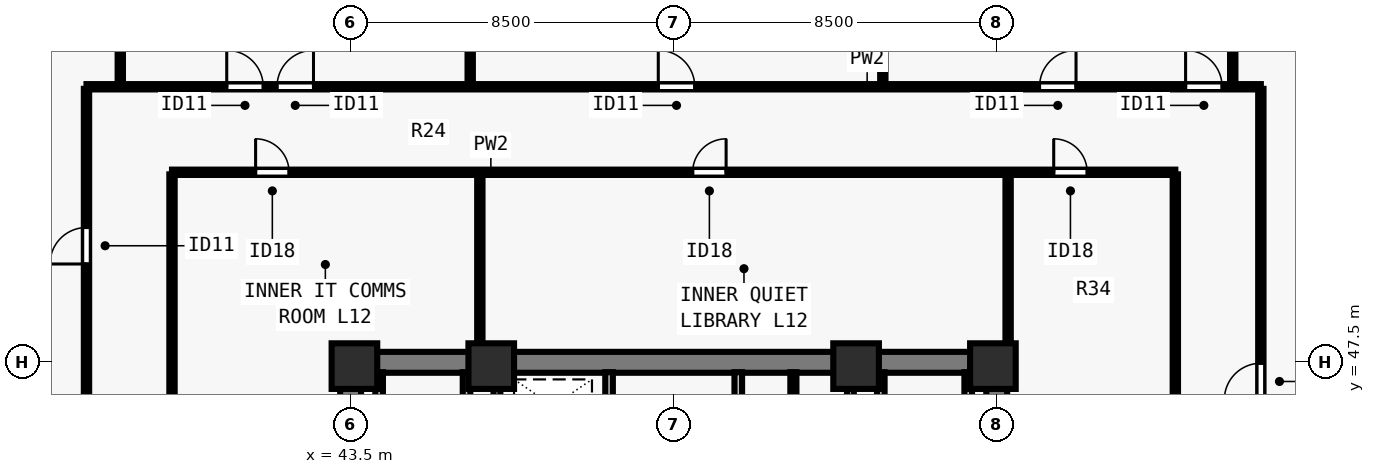
"""IFC4 building model, lengths in metres.
Left out: names, types, materials, properties, quantities, classifications, styles, units other than length and angle.
Written with IfcOpenShell. Run it as: python <this file> out.ifc"""

import sys

from ifc_helpers import new_model, si_unit, direction, frame, frame_2d, origin, origin_2d, place, context, subcontext, project, spatial, rectangle, extrude, element, fill, save


model = new_model("IFC4")
c1 = context("Model", 3, precision=1e-05, world=origin(), true_north=direction((0.0, 1.0)))
c2 = subcontext(c1, "Body", "Model", "MODEL_VIEW")
j1 = project(units=[si_unit("LENGTHUNIT", "METRE"), si_unit("PLANEANGLEUNIT", "RADIAN")], contexts=[c1])
p1 = place(None, origin())
s1 = spatial("IfcSite", under=j1, at=p1, CompositionType="ELEMENT")
p2 = place(p1, origin())
s2 = spatial("IfcBuilding", under=s1, at=p2, CompositionType="ELEMENT")
p3 = place(p2, frame((0.0, 0.0, 48.0)))
s3 = spatial("IfcBuildingStorey", under=s2, at=p3, CompositionType="ELEMENT", Elevation=48.0)
for number, where, z_axis, x_axis in (
    (1, (43.6, 47.4, 0.0), (0.0, 0.0, 1.0), (1.0, 0.0, 0.0)),
    (2, (47.2, 47.4, 0.0), (0.0, 0.0, 1.0), (1.0, 0.0, 0.0)),
    (3, (56.8, 47.4, 0.0), (0.0, 0.0, 1.0), (1.0, 0.0, 0.0)),
    (4, (60.4, 47.4, 0.0), (0.0, 0.0, 1.0), (1.0, 0.0, 0.0)),
):
    element("IfcColumn", number, at=place(p3, frame(where, z_axis=z_axis, x_axis=x_axis)), inside=s3, PredefinedType="COLUMN", context=c2, shape_type="SweptSolid", body=[
        extrude(rectangle(XDim=1.2, YDim=1.2, at=origin_2d()), origin(), (0.0, 0.0, 1.0), 3.5),
    ])
p4 = place(p3, frame((43.225, 47.5, 0.0), z_axis=(0.0, 0.0, 1.0), x_axis=(1.0, 0.0, 0.0)))
e5 = element("IfcWall", 5, at=p4, inside=s3, PredefinedType="SHEAR", context=c2, shape_type="SweptSolid", body=[
    extrude(rectangle(XDim=17.55, YDim=0.55, at=frame_2d((8.775, 0.0))), origin(), (0.0, 0.0, 1.0), 3.28),
])
for number, where, z_axis, x_axis in (
    (6, (43.5, 40.8, 0.0), (0.0, 0.0, 1.0), (0.0, 1.0, 0.0)),
    (7, (60.5, 40.8, 0.0), (0.0, 0.0, 1.0), (0.0, 1.0, 0.0)),
):
    element("IfcWall", number, at=place(p3, frame(where, z_axis=z_axis, x_axis=x_axis)), inside=s3, PredefinedType="SHEAR", context=c2, shape_type="SweptSolid", body=[
        extrude(rectangle(XDim=6.435, YDim=0.55, at=frame_2d((3.218, 0.0))), origin(), (0.0, 0.0, 1.0), 3.28),
    ])
p5 = place(p3, frame((50.3, 40.585, 0.0), z_axis=(0.0, 0.0, 1.0), x_axis=(0.0, 1.0, 0.0)))
e8 = element("IfcWall", 8, at=p5, inside=s3, PredefinedType="SOLIDWALL", context=c2, shape_type="SweptSolid", body=[
    extrude(rectangle(XDim=6.655, YDim=0.2, at=frame_2d((3.328, 0.0))), origin(), (0.0, 0.0, 1.0), 3.28),
])
p6 = place(p5, frame((5.065, 0.0, 0.0)))
e9 = element("IfcOpeningElement", 9, at=p6, cuts=e8, PredefinedType="OPENING", context=c2, shape_type="SweptSolid", body=[
    extrude(rectangle(XDim=0.8, YDim=2.08, at=frame_2d((0.4, 1.04))), frame((0.0, 0.11, 0.0), z_axis=(0.0, -1.0, 0.0), x_axis=(1.0, 0.0, 0.0)), (0.0, 0.0, 1.0), 0.22),
])
p7 = place(p3, frame((53.7, 40.585, 0.0), z_axis=(0.0, 0.0, 1.0), x_axis=(0.0, 1.0, 0.0)))
e10 = element("IfcWall", 10, at=p7, inside=s3, PredefinedType="SOLIDWALL", context=c2, shape_type="SweptSolid", body=[
    extrude(rectangle(XDim=6.655, YDim=0.2, at=frame_2d((3.328, 0.0))), origin(), (0.0, 0.0, 1.0), 3.28),
])
p8 = place(p7, frame((0.195, 0.0, 0.0)))
e11 = element("IfcOpeningElement", 11, at=p8, cuts=e10, PredefinedType="OPENING", context=c2, shape_type="SweptSolid", body=[
    extrude(rectangle(XDim=0.8, YDim=2.08, at=frame_2d((0.4, 1.04))), frame((0.0, 0.11, 0.0), z_axis=(0.0, -1.0, 0.0), x_axis=(1.0, 0.0, 0.0)), (0.0, 0.0, 1.0), 0.22),
])
p9 = place(p7, frame((4.265, 0.0, 0.0)))
e12 = element("IfcOpeningElement", 12, at=p9, cuts=e10, PredefinedType="OPENING", context=c2, shape_type="SweptSolid", body=[
    extrude(rectangle(XDim=0.95, YDim=2.12, at=frame_2d((0.475, 1.06))), frame((0.0, 0.11, 0.0), z_axis=(0.0, -1.0, 0.0), x_axis=(1.0, 0.0, 0.0)), (0.0, 0.0, 1.0), 0.22),
])
for number, where, z_axis, x_axis in (
    (13, (46.55, 43.735, 0.0), (0.0, 0.0, 1.0), (0.0, 1.0, 0.0)),
    (14, (44.25, 43.735, 0.0), (0.0, 0.0, 1.0), (0.0, 1.0, 0.0)),
    (15, (57.45, 43.735, 0.0), (0.0, 0.0, 1.0), (0.0, 1.0, 0.0)),
    (16, (59.75, 43.735, 0.0), (0.0, 0.0, 1.0), (0.0, 1.0, 0.0)),
):
    element("IfcWall", number, at=place(p3, frame(where, z_axis=z_axis, x_axis=x_axis)), inside=s3, PredefinedType="SOLIDWALL", context=c2, shape_type="SweptSolid", body=[
        extrude(rectangle(XDim=3.505, YDim=0.2, at=frame_2d((1.752, 0.0))), origin(), (0.0, 0.0, 1.0), 3.28),
    ])
for number, where, z_axis, x_axis in (
    (17, (47.35, 43.735, 0.0), (0.0, 0.0, 1.0), (0.0, 1.0, 0.0)),
    (18, (56.65, 43.735, 0.0), (0.0, 0.0, 1.0), (0.0, 1.0, 0.0)),
):
    element("IfcWall", number, at=place(p3, frame(where, z_axis=z_axis, x_axis=x_axis)), inside=s3, PredefinedType="SOLIDWALL", context=c2, shape_type="SweptSolid", body=[
        extrude(rectangle(XDim=3.505, YDim=0.18, at=frame_2d((1.752, 0.0))), origin(), (0.0, 0.0, 1.0), 3.28),
    ])
p10 = place(p3, frame((55.15, 44.195, 0.0), z_axis=(0.0, 0.0, 1.0), x_axis=(0.0, 1.0, 0.0)))
e19 = element("IfcWall", 19, at=p10, inside=s3, PredefinedType="PARTITIONING", context=c2, shape_type="SweptSolid", body=[
    extrude(rectangle(XDim=3.045, YDim=0.16, at=frame_2d((1.522, 0.0))), origin(), (0.0, 0.0, 1.0), 3.28),
])
p11 = place(p10, frame((1.025, 0.0, 0.0)))
e20 = element("IfcOpeningElement", 20, at=p11, cuts=e19, PredefinedType="OPENING", context=c2, shape_type="SweptSolid", body=[
    extrude(rectangle(XDim=0.8, YDim=2.1, at=frame_2d((0.4, 1.05))), frame((0.0, 0.09, 0.0), z_axis=(0.0, -1.0, 0.0), x_axis=(1.0, 0.0, 0.0)), (0.0, 0.0, 1.0), 0.18),
])
p12 = place(p3, frame((36.55, 54.75, 0.0), z_axis=(0.0, 0.0, 1.0), x_axis=(1.0, 0.0, 0.0)))
e21 = element("IfcWall", 21, at=p12, inside=s3, PredefinedType="PARTITIONING", context=c2, shape_type="SweptSolid", body=[
    extrude(rectangle(XDim=30.9, YDim=0.14, at=frame_2d((15.45, 0.0))), origin(), (0.0, 0.0, 1.0), 3.28),
])
p13 = place(p12, frame((3.69, 0.0, 0.0)))
e22 = element("IfcOpeningElement", 22, at=p13, cuts=e21, PredefinedType="OPENING", context=c2, shape_type="SweptSolid", body=[
    extrude(rectangle(XDim=0.96, YDim=2.12, at=frame_2d((0.48, 1.06))), frame((0.0, 0.08, 0.0), z_axis=(0.0, -1.0, 0.0), x_axis=(1.0, 0.0, 0.0)), (0.0, 0.0, 1.0), 0.16),
])
p14 = place(p12, frame((5.013, 0.0, 0.0)))
e23 = element("IfcOpeningElement", 23, at=p14, cuts=e21, PredefinedType="OPENING", context=c2, shape_type="SweptSolid", body=[
    extrude(rectangle(XDim=0.96, YDim=2.12, at=frame_2d((0.48, 1.06))), frame((0.0, 0.08, 0.0), z_axis=(0.0, -1.0, 0.0), x_axis=(1.0, 0.0, 0.0)), (0.0, 0.0, 1.0), 0.16),
])
p15 = place(p12, frame((15.045, 0.0, 0.0)))
e24 = element("IfcOpeningElement", 24, at=p15, cuts=e21, PredefinedType="OPENING", context=c2, shape_type="SweptSolid", body=[
    extrude(rectangle(XDim=0.96, YDim=2.12, at=frame_2d((0.48, 1.06))), frame((0.0, 0.08, 0.0), z_axis=(0.0, -1.0, 0.0), x_axis=(1.0, 0.0, 0.0)), (0.0, 0.0, 1.0), 0.16),
])
p16 = place(p12, frame((25.077, 0.0, 0.0)))
e25 = element("IfcOpeningElement", 25, at=p16, cuts=e21, PredefinedType="OPENING", context=c2, shape_type="SweptSolid", body=[
    extrude(rectangle(XDim=0.96, YDim=2.12, at=frame_2d((0.48, 1.06))), frame((0.0, 0.08, 0.0), z_axis=(0.0, -1.0, 0.0), x_axis=(1.0, 0.0, 0.0)), (0.0, 0.0, 1.0), 0.16),
])
p17 = place(p12, frame((28.92, 0.0, 0.0)))
e26 = element("IfcOpeningElement", 26, at=p17, cuts=e21, PredefinedType="OPENING", context=c2, shape_type="SweptSolid", body=[
    extrude(rectangle(XDim=0.96, YDim=2.12, at=frame_2d((0.48, 1.06))), frame((0.0, 0.08, 0.0), z_axis=(0.0, -1.0, 0.0), x_axis=(1.0, 0.0, 0.0)), (0.0, 0.0, 1.0), 0.16),
])
p18 = place(p3, frame((36.55, 23.305, 0.0), z_axis=(0.0, 0.0, 1.0), x_axis=(0.0, 1.0, 0.0)))
e27 = element("IfcWall", 27, at=p18, inside=s3, PredefinedType="PARTITIONING", context=c2, shape_type="SweptSolid", body=[
    extrude(rectangle(XDim=31.39, YDim=0.14, at=frame_2d((15.695, 0.0))), origin(), (0.0, 0.0, 1.0), 3.28),
])
p19 = place(p18, frame((3.307, 0.0, 0.0)))
e28 = element("IfcOpeningElement", 28, at=p19, cuts=e27, PredefinedType="OPENING", context=c2, shape_type="SweptSolid", body=[
    extrude(rectangle(XDim=0.96, YDim=2.12, at=frame_2d((0.48, 1.06))), frame((0.0, 0.08, 0.0), z_axis=(0.0, -1.0, 0.0), x_axis=(1.0, 0.0, 0.0)), (0.0, 0.0, 1.0), 0.16),
])
p20 = place(p18, frame((11.25, 0.0, 0.0)))
e29 = element("IfcOpeningElement", 29, at=p20, cuts=e27, PredefinedType="OPENING", context=c2, shape_type="SweptSolid", body=[
    extrude(rectangle(XDim=0.96, YDim=2.12, at=frame_2d((0.48, 1.06))), frame((0.0, 0.08, 0.0), z_axis=(0.0, -1.0, 0.0), x_axis=(1.0, 0.0, 0.0)), (0.0, 0.0, 1.0), 0.16),
])
p21 = place(p18, frame((19.075, 0.0, 0.0)))
e30 = element("IfcOpeningElement", 30, at=p21, cuts=e27, PredefinedType="OPENING", context=c2, shape_type="SweptSolid", body=[
    extrude(rectangle(XDim=0.96, YDim=2.12, at=frame_2d((0.48, 1.06))), frame((0.0, 0.08, 0.0), z_axis=(0.0, -1.0, 0.0), x_axis=(1.0, 0.0, 0.0)), (0.0, 0.0, 1.0), 0.16),
])
p22 = place(p18, frame((26.782, 0.0, 0.0)))
e31 = element("IfcOpeningElement", 31, at=p22, cuts=e27, PredefinedType="OPENING", context=c2, shape_type="SweptSolid", body=[
    extrude(rectangle(XDim=0.96, YDim=2.12, at=frame_2d((0.48, 1.06))), frame((0.0, 0.08, 0.0), z_axis=(0.0, -1.0, 0.0), x_axis=(1.0, 0.0, 0.0)), (0.0, 0.0, 1.0), 0.16),
])
p23 = place(p3, frame((67.45, 23.305, 0.0), z_axis=(0.0, 0.0, 1.0), x_axis=(0.0, 1.0, 0.0)))
e32 = element("IfcWall", 32, at=p23, inside=s3, PredefinedType="PARTITIONING", context=c2, shape_type="SweptSolid", body=[
    extrude(rectangle(XDim=31.39, YDim=0.14, at=frame_2d((15.695, 0.0))), origin(), (0.0, 0.0, 1.0), 3.28),
])
p24 = place(p23, frame((7.561, 0.0, 0.0)))
e33 = element("IfcOpeningElement", 33, at=p24, cuts=e32, PredefinedType="OPENING", context=c2, shape_type="SweptSolid", body=[
    extrude(rectangle(XDim=0.96, YDim=2.12, at=frame_2d((0.48, 1.06))), frame((0.0, 0.08, 0.0), z_axis=(0.0, -1.0, 0.0), x_axis=(1.0, 0.0, 0.0)), (0.0, 0.0, 1.0), 0.16),
])
p25 = place(p23, frame((23.211, 0.0, 0.0)))
e34 = element("IfcOpeningElement", 34, at=p25, cuts=e32, PredefinedType="OPENING", context=c2, shape_type="SweptSolid", body=[
    extrude(rectangle(XDim=0.96, YDim=2.12, at=frame_2d((0.48, 1.06))), frame((0.0, 0.08, 0.0), z_axis=(0.0, -1.0, 0.0), x_axis=(1.0, 0.0, 0.0)), (0.0, 0.0, 1.0), 0.16),
])
p26 = place(p3, frame((38.8, 52.5, 0.0), z_axis=(0.0, 0.0, 1.0), x_axis=(1.0, 0.0, 0.0)))
e35 = element("IfcWall", 35, at=p26, inside=s3, PredefinedType="PARTITIONING", context=c2, shape_type="SweptSolid", body=[
    extrude(rectangle(XDim=26.4, YDim=0.14, at=frame_2d((13.2, 0.0))), origin(), (0.0, 0.0, 1.0), 3.28),
])
p27 = place(p26, frame((2.2, 0.0, 0.0)))
e36 = element("IfcOpeningElement", 36, at=p27, cuts=e35, PredefinedType="OPENING", context=c2, shape_type="SweptSolid", body=[
    extrude(rectangle(XDim=0.88, YDim=2.1, at=frame_2d((0.44, 1.05))), frame((0.0, 0.08, 0.0), z_axis=(0.0, -1.0, 0.0), x_axis=(1.0, 0.0, 0.0)), (0.0, 0.0, 1.0), 0.16),
])
p28 = place(p26, frame((13.7, 0.0, 0.0)))
e37 = element("IfcOpeningElement", 37, at=p28, cuts=e35, PredefinedType="OPENING", context=c2, shape_type="SweptSolid", body=[
    extrude(rectangle(XDim=0.88, YDim=2.1, at=frame_2d((0.44, 1.05))), frame((0.0, 0.08, 0.0), z_axis=(0.0, -1.0, 0.0), x_axis=(1.0, 0.0, 0.0)), (0.0, 0.0, 1.0), 0.16),
])
p29 = place(p26, frame((23.2, 0.0, 0.0)))
e38 = element("IfcOpeningElement", 38, at=p29, cuts=e35, PredefinedType="OPENING", context=c2, shape_type="SweptSolid", body=[
    extrude(rectangle(XDim=0.88, YDim=2.1, at=frame_2d((0.44, 1.05))), frame((0.0, 0.08, 0.0), z_axis=(0.0, -1.0, 0.0), x_axis=(1.0, 0.0, 0.0)), (0.0, 0.0, 1.0), 0.16),
])
p30 = place(p3, frame((38.8, 40.8, 0.0), z_axis=(0.0, 0.0, 1.0), x_axis=(0.0, 1.0, 0.0)))
e39 = element("IfcWall", 39, at=p30, inside=s3, PredefinedType="PARTITIONING", context=c2, shape_type="SweptSolid", body=[
    extrude(rectangle(XDim=11.645, YDim=0.14, at=frame_2d((5.823, 0.0))), origin(), (0.0, 0.0, 1.0), 3.28),
])
p31 = place(p30, frame((2.5, 0.0, 0.0)))
e40 = element("IfcOpeningElement", 40, at=p31, cuts=e39, PredefinedType="OPENING", context=c2, shape_type="SweptSolid", body=[
    extrude(rectangle(XDim=0.88, YDim=2.1, at=frame_2d((0.44, 1.05))), frame((0.0, 0.08, 0.0), z_axis=(0.0, -1.0, 0.0), x_axis=(1.0, 0.0, 0.0)), (0.0, 0.0, 1.0), 0.16),
])
p32 = place(p3, frame((65.2, 40.8, 0.0), z_axis=(0.0, 0.0, 1.0), x_axis=(0.0, 1.0, 0.0)))
e41 = element("IfcWall", 41, at=p32, inside=s3, PredefinedType="PARTITIONING", context=c2, shape_type="SweptSolid", body=[
    extrude(rectangle(XDim=11.645, YDim=0.14, at=frame_2d((5.823, 0.0))), origin(), (0.0, 0.0, 1.0), 3.28),
])
p33 = place(p32, frame((2.5, 0.0, 0.0)))
e42 = element("IfcOpeningElement", 42, at=p33, cuts=e41, PredefinedType="OPENING", context=c2, shape_type="SweptSolid", body=[
    extrude(rectangle(XDim=0.88, YDim=2.1, at=frame_2d((0.44, 1.05))), frame((0.0, 0.08, 0.0), z_axis=(0.0, -1.0, 0.0), x_axis=(1.0, 0.0, 0.0)), (0.0, 0.0, 1.0), 0.16),
])
p34 = place(p3, frame((46.9, 47.76, 0.0), z_axis=(0.0, 0.0, 1.0), x_axis=(0.0, 1.0, 0.0)))
e43 = element("IfcWall", 43, at=p34, inside=s3, PredefinedType="PARTITIONING", context=c2, shape_type="SweptSolid", body=[
    extrude(rectangle(XDim=4.685, YDim=0.14, at=frame_2d((2.343, 0.0))), origin(), (0.0, 0.0, 1.0), 3.28),
])
p35 = place(p3, frame((60.8, 47.76, 0.0), z_axis=(0.0, 0.0, 1.0), x_axis=(0.0, 1.0, 0.0)))
e44 = element("IfcWall", 44, at=p35, inside=s3, PredefinedType="PARTITIONING", context=c2, shape_type="SweptSolid", body=[
    extrude(rectangle(XDim=4.685, YDim=0.14, at=frame_2d((2.343, 0.0))), origin(), (0.0, 0.0, 1.0), 2.439),
])
for number, where, z_axis, x_axis in (
    (45, (37.439, 54.85, 0.0), (0.0, 0.0, 1.0), (0.0, 1.0, 0.0)),
    (46, (46.646, 54.85, 0.0), (0.0, 0.0, 1.0), (0.0, 1.0, 0.0)),
    (47, (57.503, 54.85, 0.0), (0.0, 0.0, 1.0), (0.0, 1.0, 0.0)),
):
    element("IfcWall", number, at=place(p3, frame(where, z_axis=z_axis, x_axis=x_axis)), inside=s3, PredefinedType="PARTITIONING", context=c2, shape_type="SweptSolid", body=[
        extrude(rectangle(XDim=9.23, YDim=0.14, at=frame_2d((4.615, 0.0))), origin(), (0.0, 0.0, 1.0), 3.28),
    ])
p36 = place(p3, frame((66.71, 54.85, 0.0), z_axis=(0.0, 0.0, 1.0), x_axis=(0.0, 1.0, 0.0)))
e48 = element("IfcWall", 48, at=p36, inside=s3, PredefinedType="PARTITIONING", context=c2, shape_type="SweptSolid", body=[
    extrude(rectangle(XDim=9.23, YDim=0.14, at=frame_2d((4.615, 0.0))), origin(), (0.0, 0.0, 1.0), 2.439),
])
p37 = place(p27, origin())
e49 = element("IfcDoor", 49, at=p37, inside=s3, OperationType="SINGLE_SWING_LEFT", PredefinedType="DOOR", context=c2, shape_type="SweptSolid", body=[
    extrude(rectangle(XDim=0.88, YDim=2.1, at=frame_2d((0.44, 1.05))), frame((0.0, 0.025, 0.0), z_axis=(0.0, -1.0, 0.0), x_axis=(1.0, 0.0, 0.0)), (0.0, 0.0, 1.0), 0.05),
])
fill(e36, e49)
p38 = place(p28, origin())
e50 = element("IfcDoor", 50, at=p38, inside=s3, OperationType="SINGLE_SWING_RIGHT", PredefinedType="DOOR", context=c2, shape_type="SweptSolid", body=[
    extrude(rectangle(XDim=0.88, YDim=2.1, at=frame_2d((0.44, 1.05))), frame((0.0, 0.025, 0.0), z_axis=(0.0, -1.0, 0.0), x_axis=(1.0, 0.0, 0.0)), (0.0, 0.0, 1.0), 0.05),
])
fill(e37, e50)
p39 = place(p29, origin())
e51 = element("IfcDoor", 51, at=p39, inside=s3, OperationType="SINGLE_SWING_LEFT", PredefinedType="DOOR", context=c2, shape_type="SweptSolid", body=[
    extrude(rectangle(XDim=0.88, YDim=2.1, at=frame_2d((0.44, 1.05))), frame((0.0, 0.025, 0.0), z_axis=(0.0, -1.0, 0.0), x_axis=(1.0, 0.0, 0.0)), (0.0, 0.0, 1.0), 0.05),
])
fill(e38, e51)
p40 = place(p13, origin())
e52 = element("IfcDoor", 52, at=p40, inside=s3, OperationType="SINGLE_SWING_LEFT", PredefinedType="DOOR", context=c2, shape_type="SweptSolid", body=[
    extrude(rectangle(XDim=0.96, YDim=2.12, at=frame_2d((0.48, 1.06))), frame((0.0, 0.025, 0.0), z_axis=(0.0, -1.0, 0.0), x_axis=(1.0, 0.0, 0.0)), (0.0, 0.0, 1.0), 0.05),
])
fill(e22, e52)
p41 = place(p14, origin())
e53 = element("IfcDoor", 53, at=p41, inside=s3, OperationType="SINGLE_SWING_RIGHT", PredefinedType="DOOR", context=c2, shape_type="SweptSolid", body=[
    extrude(rectangle(XDim=0.96, YDim=2.12, at=frame_2d((0.48, 1.06))), frame((0.0, 0.025, 0.0), z_axis=(0.0, -1.0, 0.0), x_axis=(1.0, 0.0, 0.0)), (0.0, 0.0, 1.0), 0.05),
])
fill(e23, e53)
p42 = place(p15, origin())
e54 = element("IfcDoor", 54, at=p42, inside=s3, OperationType="SINGLE_SWING_LEFT", PredefinedType="DOOR", context=c2, shape_type="SweptSolid", body=[
    extrude(rectangle(XDim=0.96, YDim=2.12, at=frame_2d((0.48, 1.06))), frame((0.0, 0.025, 0.0), z_axis=(0.0, -1.0, 0.0), x_axis=(1.0, 0.0, 0.0)), (0.0, 0.0, 1.0), 0.05),
])
fill(e24, e54)
p43 = place(p16, origin())
e55 = element("IfcDoor", 55, at=p43, inside=s3, OperationType="SINGLE_SWING_RIGHT", PredefinedType="DOOR", context=c2, shape_type="SweptSolid", body=[
    extrude(rectangle(XDim=0.96, YDim=2.12, at=frame_2d((0.48, 1.06))), frame((0.0, 0.025, 0.0), z_axis=(0.0, -1.0, 0.0), x_axis=(1.0, 0.0, 0.0)), (0.0, 0.0, 1.0), 0.05),
])
fill(e25, e55)
p44 = place(p17, origin())
e56 = element("IfcDoor", 56, at=p44, inside=s3, OperationType="SINGLE_SWING_LEFT", PredefinedType="DOOR", context=c2, shape_type="SweptSolid", body=[
    extrude(rectangle(XDim=0.96, YDim=2.12, at=frame_2d((0.48, 1.06))), frame((0.0, 0.025, 0.0), z_axis=(0.0, -1.0, 0.0), x_axis=(1.0, 0.0, 0.0)), (0.0, 0.0, 1.0), 0.05),
])
fill(e26, e56)
p45 = place(p22, origin())
e57 = element("IfcDoor", 57, at=p45, inside=s3, OperationType="SINGLE_SWING_LEFT", PredefinedType="DOOR", context=c2, shape_type="SweptSolid", body=[
    extrude(rectangle(XDim=0.96, YDim=2.12, at=frame_2d((0.48, 1.06))), frame((0.0, 0.025, 0.0), z_axis=(0.0, -1.0, 0.0), x_axis=(1.0, 0.0, 0.0)), (0.0, 0.0, 1.0), 0.05),
])
fill(e31, e57)
p46 = place(p25, origin())
e58 = element("IfcDoor", 58, at=p46, inside=s3, OperationType="SINGLE_SWING_LEFT", PredefinedType="DOOR", context=c2, shape_type="SweptSolid", body=[
    extrude(rectangle(XDim=0.96, YDim=2.12, at=frame_2d((0.48, 1.06))), frame((0.0, 0.025, 0.0), z_axis=(0.0, -1.0, 0.0), x_axis=(1.0, 0.0, 0.0)), (0.0, 0.0, 1.0), 0.05),
])
fill(e34, e58)
save(model, sys.argv[1])
